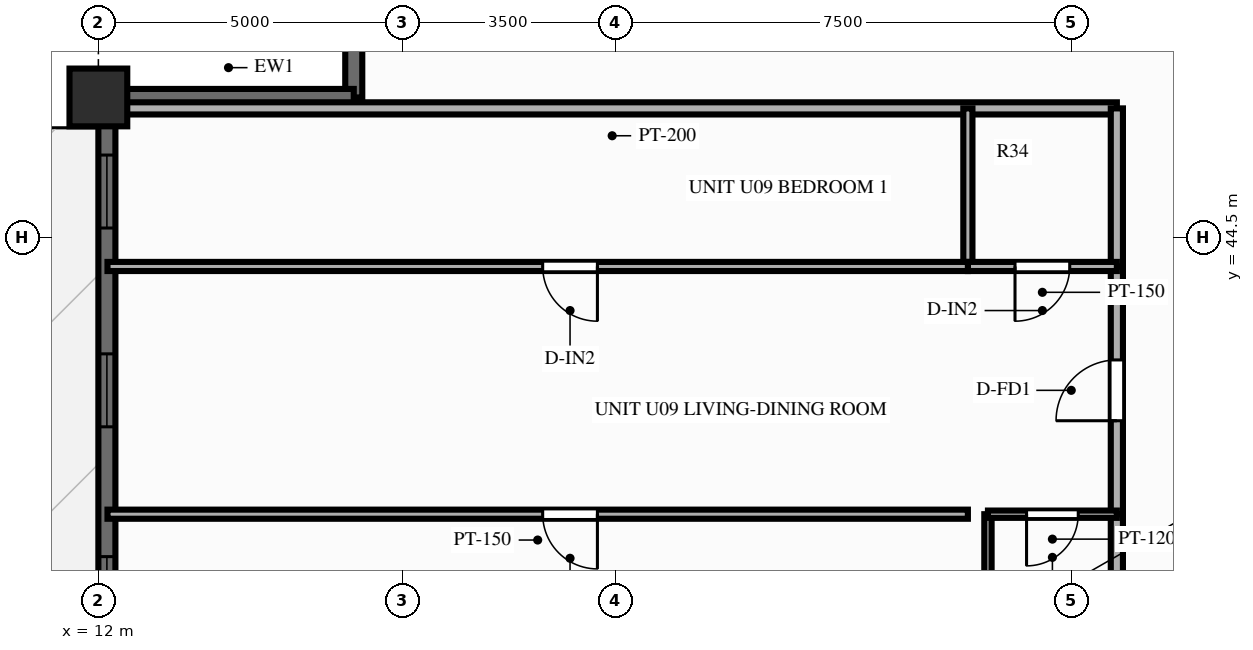
"""IFC4 building model, lengths in metres.
Left out: names, types, materials, properties, quantities, classifications, styles, units other than length and angle.
Written with IfcOpenShell. Run it as: python <this file> out.ifc"""

import sys

from ifc_helpers import new_model, si_unit, direction, frame, frame_2d, origin, origin_2d, place, context, subcontext, project, spatial, rectangle, extrude, source, transform, mapped, element, fill, save


model = new_model("IFC4")
c1 = context("Model", 3, precision=1e-05, world=origin(), true_north=direction((0.0, 1.0)))
c2 = subcontext(c1, "Body", "Model", "MODEL_VIEW")
j1 = project(units=[si_unit("LENGTHUNIT", "METRE"), si_unit("PLANEANGLEUNIT", "RADIAN")], contexts=[c1])
p1 = place(None, origin())
s1 = spatial("IfcSite", under=j1, at=p1, CompositionType="ELEMENT")
p2 = place(p1, origin())
s2 = spatial("IfcBuilding", under=s1, at=p2, CompositionType="ELEMENT")
p3 = place(p2, frame((0.0, 0.0, 104.85)))
s3 = spatial("IfcBuildingStorey", under=s2, at=p3, CompositionType="ELEMENT", Elevation=104.85)
m1 = source(origin(), c2, "Body", "SweptSolid", [
    extrude(rectangle(XDim=0.95, YDim=0.95, at=origin_2d()), origin(), (0.0, 0.0, 1.0), 3.0),
])
p4 = place(p3, frame((12.0, 46.8, 0.0), z_axis=(0.0, 0.0, 1.0), x_axis=(1.0, 0.0, 0.0)))
e1 = element("IfcColumn", 1, at=p4, inside=s3, PredefinedType="COLUMN", context=c2, shape_type="MappedRepresentation", body=[
    mapped(m1, transform((0.0, 0.0, 0.0), scale=1.0)),
])
p5 = place(p3, frame((12.14, 7.2, 0.0), z_axis=(0.0, 0.0, 1.0), x_axis=(0.0, 1.0, 0.0)))
e2 = element("IfcWall", 2, at=p5, inside=s3, PredefinedType="SOLIDWALL", context=c2, shape_type="SweptSolid", body=[
    extrude(rectangle(XDim=39.6, YDim=0.28, at=frame_2d((19.8, 0.0))), origin(), (0.0, 0.0, 1.0), 2.28),
])
p6 = place(p5, frame((0.945, 0.0, 0.25)))
e3 = element("IfcOpeningElement", 3, at=p6, cuts=e2, PredefinedType="OPENING", context=c2, shape_type="SweptSolid", body=[
    extrude(rectangle(XDim=1.2, YDim=1.5, at=frame_2d((0.6, 0.75))), frame((0.0, 0.152, 0.0), z_axis=(0.0, -1.0, 0.0), x_axis=(1.0, 0.0, 0.0)), (0.0, 0.0, 1.0), 0.304),
])
p7 = place(p5, frame((4.213, 0.0, 0.25)))
e4 = element("IfcOpeningElement", 4, at=p7, cuts=e2, PredefinedType="OPENING", context=c2, shape_type="SweptSolid", body=[
    extrude(rectangle(XDim=1.2, YDim=1.5, at=frame_2d((0.6, 0.75))), frame((0.0, 0.152, 0.0), z_axis=(0.0, -1.0, 0.0), x_axis=(1.0, 0.0, 0.0)), (0.0, 0.0, 1.0), 0.304),
])
p8 = place(p5, frame((7.55, 0.0, 0.25)))
e5 = element("IfcOpeningElement", 5, at=p8, cuts=e2, PredefinedType="OPENING", context=c2, shape_type="SweptSolid", body=[
    extrude(rectangle(XDim=1.2, YDim=1.5, at=frame_2d((0.6, 0.75))), frame((0.0, 0.152, 0.0), z_axis=(0.0, -1.0, 0.0), x_axis=(1.0, 0.0, 0.0)), (0.0, 0.0, 1.0), 0.304),
])
p9 = place(p5, frame((13.483, 0.0, 0.25)))
e6 = element("IfcOpeningElement", 6, at=p9, cuts=e2, PredefinedType="OPENING", context=c2, shape_type="SweptSolid", body=[
    extrude(rectangle(XDim=1.2, YDim=1.5, at=frame_2d((0.6, 0.75))), frame((0.0, 0.152, 0.0), z_axis=(0.0, -1.0, 0.0), x_axis=(1.0, 0.0, 0.0)), (0.0, 0.0, 1.0), 0.304),
])
p10 = place(p5, frame((16.82, 0.0, 0.25)))
e7 = element("IfcOpeningElement", 7, at=p10, cuts=e2, PredefinedType="OPENING", context=c2, shape_type="SweptSolid", body=[
    extrude(rectangle(XDim=1.2, YDim=1.5, at=frame_2d((0.6, 0.75))), frame((0.0, 0.152, 0.0), z_axis=(0.0, -1.0, 0.0), x_axis=(1.0, 0.0, 0.0)), (0.0, 0.0, 1.0), 0.304),
])
p11 = place(p5, frame((19.2, 0.0, 0.25)))
e8 = element("IfcOpeningElement", 8, at=p11, cuts=e2, PredefinedType="OPENING", context=c2, shape_type="SweptSolid", body=[
    extrude(rectangle(XDim=1.2, YDim=1.5, at=frame_2d((0.6, 0.75))), frame((0.0, 0.152, 0.0), z_axis=(0.0, -1.0, 0.0), x_axis=(1.0, 0.0, 0.0)), (0.0, 0.0, 1.0), 0.304),
])
p12 = place(p5, frame((21.578, 0.0, 0.25)))
e9 = element("IfcOpeningElement", 9, at=p12, cuts=e2, PredefinedType="OPENING", context=c2, shape_type="SweptSolid", body=[
    extrude(rectangle(XDim=1.2, YDim=1.5, at=frame_2d((0.6, 0.75))), frame((0.0, 0.152, 0.0), z_axis=(0.0, -1.0, 0.0), x_axis=(1.0, 0.0, 0.0)), (0.0, 0.0, 1.0), 0.304),
])
p13 = place(p5, frame((24.713, 0.0, 0.0)))
e10 = element("IfcOpeningElement", 10, at=p13, cuts=e2, PredefinedType="OPENING", context=c2, shape_type="SweptSolid", body=[
    extrude(rectangle(XDim=1.6, YDim=2.15, at=frame_2d((0.8, 1.075))), frame((0.0, 0.152, 0.0), z_axis=(0.0, -1.0, 0.0), x_axis=(1.0, 0.0, 0.0)), (0.0, 0.0, 1.0), 0.304),
])
p14 = place(p5, frame((29.305, 0.0, 0.25)))
e11 = element("IfcOpeningElement", 11, at=p14, cuts=e2, PredefinedType="OPENING", context=c2, shape_type="SweptSolid", body=[
    extrude(rectangle(XDim=0.7, YDim=1.5, at=frame_2d((0.35, 0.75))), frame((0.0, 0.152, 0.0), z_axis=(0.0, -1.0, 0.0), x_axis=(1.0, 0.0, 0.0)), (0.0, 0.0, 1.0), 0.304),
])
p15 = place(p5, frame((30.848, 0.0, 0.25)))
e12 = element("IfcOpeningElement", 12, at=p15, cuts=e2, PredefinedType="OPENING", context=c2, shape_type="SweptSolid", body=[
    extrude(rectangle(XDim=1.2, YDim=1.5, at=frame_2d((0.6, 0.75))), frame((0.0, 0.152, 0.0), z_axis=(0.0, -1.0, 0.0), x_axis=(1.0, 0.0, 0.0)), (0.0, 0.0, 1.0), 0.304),
])
p16 = place(p5, frame((34.183, 0.0, 0.25)))
e13 = element("IfcOpeningElement", 13, at=p16, cuts=e2, PredefinedType="OPENING", context=c2, shape_type="SweptSolid", body=[
    extrude(rectangle(XDim=1.2, YDim=1.5, at=frame_2d((0.6, 0.75))), frame((0.0, 0.152, 0.0), z_axis=(0.0, -1.0, 0.0), x_axis=(1.0, 0.0, 0.0)), (0.0, 0.0, 1.0), 0.304),
])
p17 = place(p5, frame((37.452, 0.0, 0.25)))
e14 = element("IfcOpeningElement", 14, at=p17, cuts=e2, PredefinedType="OPENING", context=c2, shape_type="SweptSolid", body=[
    extrude(rectangle(XDim=1.2, YDim=1.5, at=frame_2d((0.6, 0.75))), frame((0.0, 0.152, 0.0), z_axis=(0.0, -1.0, 0.0), x_axis=(1.0, 0.0, 0.0)), (0.0, 0.0, 1.0), 0.304),
])
for number, where, z_axis, x_axis in (
    (15, (16.2, 46.8, 0.0), (0.0, 0.0, 1.0), (0.0, 1.0, 0.0)),
    (16, (12.08, 46.8, 0.0), (0.0, 0.0, 1.0), (1.0, 0.0, 0.0)),
):
    element("IfcWall", number, at=place(p3, frame(where, z_axis=z_axis, x_axis=x_axis)), inside=s3, PredefinedType="SOLIDWALL", context=c2, shape_type="SweptSolid", body=[
        extrude(rectangle(XDim=4.12, YDim=0.28, at=frame_2d((2.06, 0.0))), origin(), (0.0, 0.0, 1.0), 2.28),
    ])
p18 = place(p3, frame((28.75, 46.62, 0.0), z_axis=(0.0, 0.0, 1.0), x_axis=(-1.0, 0.0, 0.0)))
e17 = element("IfcWall", 17, at=p18, inside=s3, PredefinedType="PARTITIONING", context=c2, shape_type="SweptSolid", body=[
    extrude(rectangle(XDim=16.6, YDim=0.2, at=frame_2d((8.3, 0.0))), origin(), (0.0, 0.0, 1.0), 2.79),
])
p19 = place(p3, frame((28.75, 37.35, 0.0), z_axis=(0.0, 0.0, 1.0), x_axis=(0.0, 1.0, 0.0)))
e18 = element("IfcWall", 18, at=p19, inside=s3, PredefinedType="PARTITIONING", context=c2, shape_type="SweptSolid", body=[
    extrude(rectangle(XDim=2.595, YDim=0.2, at=frame_2d((1.298, 0.0))), origin(), (0.0, 0.0, 1.0), 2.79),
])
p20 = place(p3, frame((28.75, 39.946, 0.0), z_axis=(0.0, 0.0, 1.0), x_axis=(0.0, 1.0, 0.0)))
e19 = element("IfcWall", 19, at=p20, inside=s3, PredefinedType="PARTITIONING", context=c2, shape_type="SweptSolid", body=[
    extrude(rectangle(XDim=4.074, YDim=0.2, at=frame_2d((2.037, 0.0))), origin(), (0.0, 0.0, 1.0), 2.79),
])
p21 = place(p20, frame((1.537, 0.0, 0.0)))
e20 = element("IfcOpeningElement", 20, at=p21, cuts=e19, PredefinedType="OPENING", context=c2, shape_type="SweptSolid", body=[
    extrude(rectangle(XDim=1.0, YDim=2.15, at=frame_2d((0.5, 1.075))), frame((0.0, 0.112, 0.0), z_axis=(0.0, -1.0, 0.0), x_axis=(1.0, 0.0, 0.0)), (0.0, 0.0, 1.0), 0.224),
])
p22 = place(p3, frame((28.75, 44.02, 0.0), z_axis=(0.0, 0.0, 1.0), x_axis=(0.0, 1.0, 0.0)))
e21 = element("IfcWall", 21, at=p22, inside=s3, PredefinedType="PARTITIONING", context=c2, shape_type="SweptSolid", body=[
    extrude(rectangle(XDim=2.6, YDim=0.2, at=frame_2d((1.3, 0.0))), origin(), (0.0, 0.0, 1.0), 2.79),
])
p23 = place(p3, frame((26.63, 37.35, 0.0), z_axis=(0.0, 0.0, 1.0), x_axis=(0.0, 1.0, 0.0)))
e22 = element("IfcWall", 22, at=p23, inside=s3, PredefinedType="PARTITIONING", context=c2, shape_type="SweptSolid", body=[
    extrude(rectangle(XDim=2.595, YDim=0.12, at=frame_2d((1.298, 0.0))), origin(), (0.0, 0.0, 1.0), 2.79),
])
p24 = place(p3, frame((26.3, 44.02, 0.0), z_axis=(0.0, 0.0, 1.0), x_axis=(0.0, 1.0, 0.0)))
e23 = element("IfcWall", 23, at=p24, inside=s3, PredefinedType="PARTITIONING", context=c2, shape_type="SweptSolid", body=[
    extrude(rectangle(XDim=2.6, YDim=0.15, at=frame_2d((1.3, 0.0))), origin(), (0.0, 0.0, 1.0), 2.79),
])
p25 = place(p3, frame((28.75, 39.946, 0.0), z_axis=(0.0, 0.0, 1.0), x_axis=(-1.0, 0.0, 0.0)))
e24 = element("IfcWall", 24, at=p25, inside=s3, PredefinedType="PARTITIONING", context=c2, shape_type="SweptSolid", body=[
    extrude(rectangle(XDim=2.12, YDim=0.12, at=frame_2d((1.06, 0.0))), origin(), (0.0, 0.0, 1.0), 2.79),
])
p26 = place(p25, frame((0.635, 0.0, 0.0)))
e25 = element("IfcOpeningElement", 25, at=p26, cuts=e24, PredefinedType="OPENING", context=c2, shape_type="SweptSolid", body=[
    extrude(rectangle(XDim=0.85, YDim=2.05, at=frame_2d((0.425, 1.025))), frame((0.0, 0.072, 0.0), z_axis=(0.0, -1.0, 0.0), x_axis=(1.0, 0.0, 0.0)), (0.0, 0.0, 1.0), 0.144),
])
p27 = place(p3, frame((26.3, 39.946, 0.0), z_axis=(0.0, 0.0, 1.0), x_axis=(-1.0, 0.0, 0.0)))
e26 = element("IfcWall", 26, at=p27, inside=s3, PredefinedType="PARTITIONING", context=c2, shape_type="SweptSolid", body=[
    extrude(rectangle(XDim=14.15, YDim=0.15, at=frame_2d((7.075, 0.0))), origin(), (0.0, 0.0, 1.0), 2.79),
])
p28 = place(p27, frame((6.093, 0.0, 0.0)))
e27 = element("IfcOpeningElement", 27, at=p28, cuts=e26, PredefinedType="OPENING", context=c2, shape_type="SweptSolid", body=[
    extrude(rectangle(XDim=0.9, YDim=2.1, at=frame_2d((0.45, 1.05))), frame((0.0, 0.087, 0.0), z_axis=(0.0, -1.0, 0.0), x_axis=(1.0, 0.0, 0.0)), (0.0, 0.0, 1.0), 0.174),
])
p29 = place(p3, frame((28.75, 44.02, 0.0), z_axis=(0.0, 0.0, 1.0), x_axis=(-1.0, 0.0, 0.0)))
e28 = element("IfcWall", 28, at=p29, inside=s3, PredefinedType="PARTITIONING", context=c2, shape_type="SweptSolid", body=[
    extrude(rectangle(XDim=2.45, YDim=0.15, at=frame_2d((1.225, 0.0))), origin(), (0.0, 0.0, 1.0), 2.79),
])
p30 = place(p29, frame((0.775, 0.0, 0.0)))
e29 = element("IfcOpeningElement", 29, at=p30, cuts=e28, PredefinedType="OPENING", context=c2, shape_type="SweptSolid", body=[
    extrude(rectangle(XDim=0.9, YDim=2.1, at=frame_2d((0.45, 1.05))), frame((0.0, 0.087, 0.0), z_axis=(0.0, -1.0, 0.0), x_axis=(1.0, 0.0, 0.0)), (0.0, 0.0, 1.0), 0.174),
])
p31 = place(p3, frame((26.3, 44.02, 0.0), z_axis=(0.0, 0.0, 1.0), x_axis=(-1.0, 0.0, 0.0)))
e30 = element("IfcWall", 30, at=p31, inside=s3, PredefinedType="PARTITIONING", context=c2, shape_type="SweptSolid", body=[
    extrude(rectangle(XDim=14.15, YDim=0.15, at=frame_2d((7.075, 0.0))), origin(), (0.0, 0.0, 1.0), 2.79),
])
p32 = place(p31, frame((6.093, 0.0, 0.0)))
e31 = element("IfcOpeningElement", 31, at=p32, cuts=e30, PredefinedType="OPENING", context=c2, shape_type="SweptSolid", body=[
    extrude(rectangle(XDim=0.9, YDim=2.1, at=frame_2d((0.45, 1.05))), frame((0.0, 0.087, 0.0), z_axis=(0.0, -1.0, 0.0), x_axis=(1.0, 0.0, 0.0)), (0.0, 0.0, 1.0), 0.174),
])
m2 = source(origin(), c2, "Body", "SweptSolid", [
    extrude(rectangle(XDim=1.2, YDim=1.5, at=frame_2d((0.6, 0.75))), frame((0.0, 0.03, 0.0), z_axis=(0.0, -1.0, 0.0), x_axis=(1.0, 0.0, 0.0)), (0.0, 0.0, 1.0), 0.06),
])
p33 = place(p15, origin())
e32 = element("IfcWindow", 32, at=p33, inside=s3, PartitioningType="SINGLE_PANEL", PredefinedType="WINDOW", context=c2, shape_type="MappedRepresentation", body=[
    mapped(m2, transform((0.0, 0.0, 0.0), scale=1.0)),
])
fill(e12, e32)
p34 = place(p16, origin())
e33 = element("IfcWindow", 33, at=p34, inside=s3, PartitioningType="SINGLE_PANEL", PredefinedType="WINDOW", context=c2, shape_type="MappedRepresentation", body=[
    mapped(m2, transform((0.0, 0.0, 0.0), scale=1.0)),
])
fill(e13, e33)
p35 = place(p17, origin())
e34 = element("IfcWindow", 34, at=p35, inside=s3, PartitioningType="SINGLE_PANEL", PredefinedType="WINDOW", context=c2, shape_type="MappedRepresentation", body=[
    mapped(m2, transform((0.0, 0.0, 0.0), scale=1.0)),
])
fill(e14, e34)
m3 = source(origin(), c2, "Body", "SweptSolid", [
    extrude(rectangle(XDim=1.0, YDim=2.15, at=frame_2d((0.5, 1.075))), frame((0.0, 0.025, 0.0), z_axis=(0.0, -1.0, 0.0), x_axis=(1.0, 0.0, 0.0)), (0.0, 0.0, 1.0), 0.05),
])
p36 = place(p21, origin())
e35 = element("IfcDoor", 35, at=p36, inside=s3, OperationType="SINGLE_SWING_LEFT", PredefinedType="DOOR", context=c2, shape_type="MappedRepresentation", body=[
    mapped(m3, transform((0.0, 0.0, 0.0), scale=1.0)),
])
fill(e20, e35)
m4 = source(origin(), c2, "Body", "SweptSolid", [
    extrude(rectangle(XDim=0.85, YDim=2.05, at=frame_2d((0.425, 1.025))), frame((0.0, 0.025, 0.0), z_axis=(0.0, -1.0, 0.0), x_axis=(1.0, 0.0, 0.0)), (0.0, 0.0, 1.0), 0.05),
])
p37 = place(p26, origin())
e36 = element("IfcDoor", 36, at=p37, inside=s3, OperationType="SINGLE_SWING_RIGHT", PredefinedType="DOOR", context=c2, shape_type="MappedRepresentation", body=[
    mapped(m4, transform((0.0, 0.0, 0.0), scale=1.0)),
])
fill(e25, e36)
m5 = source(origin(), c2, "Body", "SweptSolid", [
    extrude(rectangle(XDim=0.9, YDim=2.1, at=frame_2d((0.45, 1.05))), frame((0.0, 0.025, 0.0), z_axis=(0.0, -1.0, 0.0), x_axis=(1.0, 0.0, 0.0)), (0.0, 0.0, 1.0), 0.05),
])
p38 = place(p28, origin())
e37 = element("IfcDoor", 37, at=p38, inside=s3, OperationType="SINGLE_SWING_LEFT", PredefinedType="DOOR", context=c2, shape_type="MappedRepresentation", body=[
    mapped(m5, transform((0.0, 0.0, 0.0), scale=1.0)),
])
fill(e27, e37)
p39 = place(p30, origin())
e38 = element("IfcDoor", 38, at=p39, inside=s3, OperationType="SINGLE_SWING_RIGHT", PredefinedType="DOOR", context=c2, shape_type="MappedRepresentation", body=[
    mapped(m5, transform((0.0, 0.0, 0.0), scale=1.0)),
])
fill(e29, e38)
p40 = place(p32, origin())
e39 = element("IfcDoor", 39, at=p40, inside=s3, OperationType="SINGLE_SWING_LEFT", PredefinedType="DOOR", context=c2, shape_type="MappedRepresentation", body=[
    mapped(m5, transform((0.0, 0.0, 0.0), scale=1.0)),
])
fill(e31, e39)
save(model, sys.argv[1])
